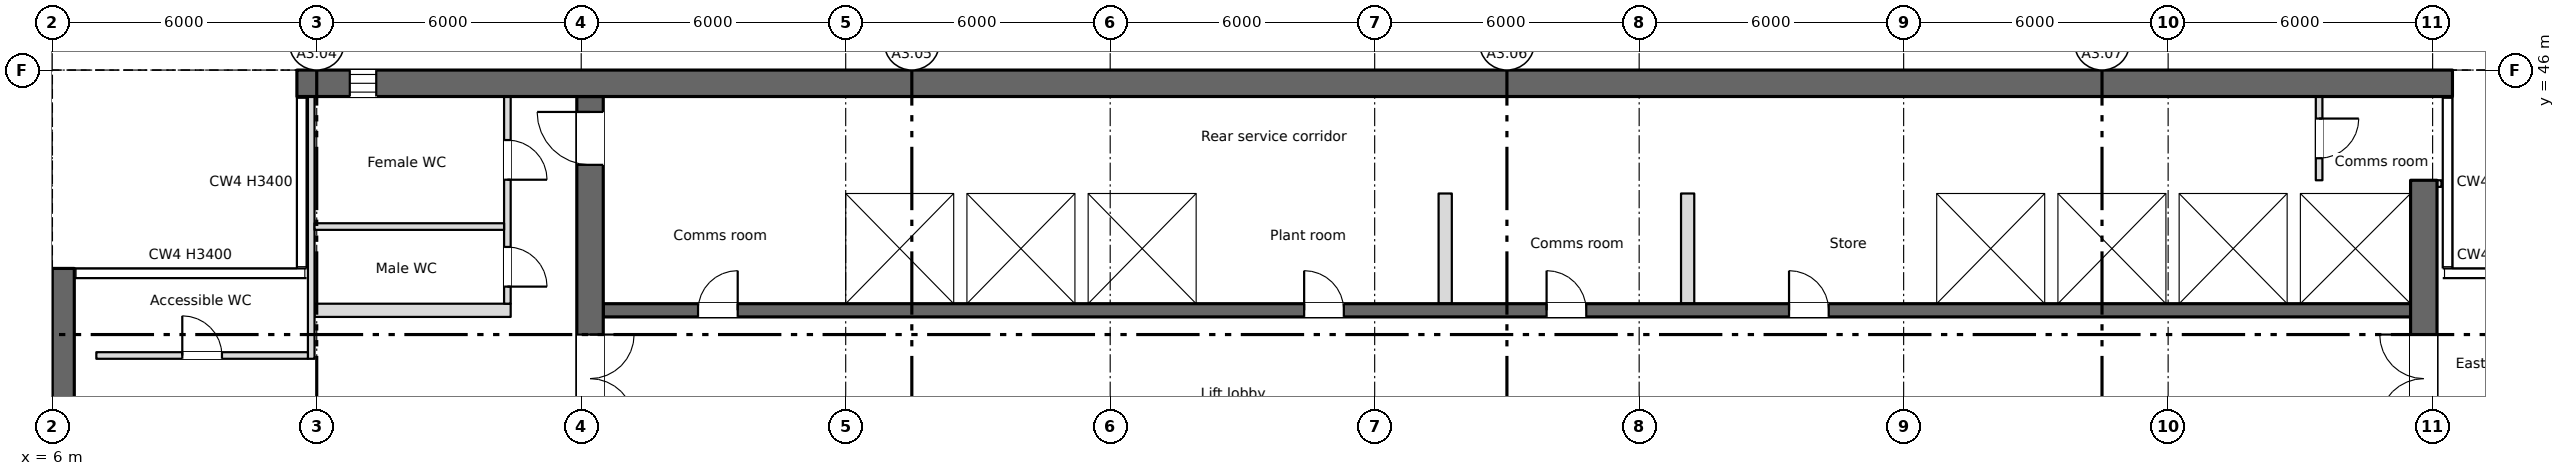
"""IFC4 building model, lengths in metres.
Left out: names, types, materials, properties, quantities, classifications, styles, units other than length and angle.
Written with IfcOpenShell. Run it as: python <this file> out.ifc"""

import sys

from ifc_helpers import new_model, si_unit, direction, frame, frame_2d, origin, place, context, subcontext, project, spatial, rectangle, extrude, element, fill, save


model = new_model("IFC4")
c1 = context("Model", 3, precision=1e-05, world=origin(), true_north=direction((0.0, 1.0)))
c2 = subcontext(c1, "Body", "Model", "MODEL_VIEW")
j1 = project(units=[si_unit("LENGTHUNIT", "METRE"), si_unit("PLANEANGLEUNIT", "RADIAN")], contexts=[c1])
p1 = place(None, origin())
s1 = spatial("IfcSite", under=j1, at=p1, CompositionType="ELEMENT")
p2 = place(p1, origin())
s2 = spatial("IfcBuilding", under=s1, at=p2, CompositionType="ELEMENT")
p3 = place(p2, frame((0.0, 0.0, 235.55)))
s3 = spatial("IfcBuildingStorey", under=s2, at=p3, CompositionType="ELEMENT", Elevation=235.55)
p4 = place(p3, frame((6.25, 8.5, 0.0), z_axis=(0.0, 0.0, 1.0), x_axis=(0.0, 1.0, 0.0)))
e1 = element("IfcWall", 1, at=p4, inside=s3, PredefinedType="SHEAR", context=c2, shape_type="SweptSolid", body=[
    extrude(rectangle(XDim=33.0, YDim=0.5, at=frame_2d((16.5, 0.0))), origin(), (0.0, 0.0, 1.0), 3.4),
])
p5 = place(p4, frame((1.6, 0.0, 0.6)))
e2 = element("IfcOpeningElement", 2, at=p5, cuts=e1, PredefinedType="OPENING", context=c2, shape_type="SweptSolid", body=[
    extrude(rectangle(XDim=0.6, YDim=2.4, at=frame_2d((0.3, 1.2))), frame((0.0, 0.26, 0.0), z_axis=(0.0, -1.0, 0.0), x_axis=(1.0, 0.0, 0.0)), (0.0, 0.0, 1.0), 0.52),
])
p6 = place(p4, frame((7.55, 0.0, 0.6)))
e3 = element("IfcOpeningElement", 3, at=p6, cuts=e1, PredefinedType="OPENING", context=c2, shape_type="SweptSolid", body=[
    extrude(rectangle(XDim=0.6, YDim=2.4, at=frame_2d((0.3, 1.2))), frame((0.0, 0.26, 0.0), z_axis=(0.0, -1.0, 0.0), x_axis=(1.0, 0.0, 0.0)), (0.0, 0.0, 1.0), 0.52),
])
p7 = place(p4, frame((13.2, 0.0, 0.6)))
e4 = element("IfcOpeningElement", 4, at=p7, cuts=e1, PredefinedType="OPENING", context=c2, shape_type="SweptSolid", body=[
    extrude(rectangle(XDim=0.6, YDim=2.4, at=frame_2d((0.3, 1.2))), frame((0.0, 0.26, 0.0), z_axis=(0.0, -1.0, 0.0), x_axis=(1.0, 0.0, 0.0)), (0.0, 0.0, 1.0), 0.52),
])
p8 = place(p3, frame((11.55, 45.7, 0.0), z_axis=(0.0, 0.0, 1.0), x_axis=(1.0, 0.0, 0.0)))
e5 = element("IfcWall", 5, at=p8, inside=s3, PredefinedType="SHEAR", context=c2, shape_type="SweptSolid", body=[
    extrude(rectangle(XDim=48.9, YDim=0.6, at=frame_2d((24.45, 0.0))), origin(), (0.0, 0.0, 1.0), 3.4),
])
p9 = place(p8, frame((1.2, 0.0, 0.6)))
e6 = element("IfcOpeningElement", 6, at=p9, cuts=e5, PredefinedType="OPENING", context=c2, shape_type="SweptSolid", body=[
    extrude(rectangle(XDim=0.6, YDim=2.4, at=frame_2d((0.3, 1.2))), frame((0.0, 0.31, 0.0), z_axis=(0.0, -1.0, 0.0), x_axis=(1.0, 0.0, 0.0)), (0.0, 0.0, 1.0), 0.62),
])
p10 = place(p3, frame((6.75, 28.4, 0.0), z_axis=(0.0, 0.0, 1.0), x_axis=(0.0, 1.0, 0.0)))
e7 = element("IfcWall", 7, at=p10, inside=s3, PredefinedType="SHEAR", context=c2, shape_type="SweptSolid", body=[
    extrude(rectangle(XDim=12.85, YDim=0.5, at=frame_2d((6.425, 0.0))), origin(), (0.0, 0.0, 1.0), 3.4),
])
p11 = place(p3, frame((18.2, 28.4, 0.0), z_axis=(0.0, 0.0, 1.0), x_axis=(0.0, 1.0, 0.0)))
e8 = element("IfcWall", 8, at=p11, inside=s3, PredefinedType="SHEAR", context=c2, shape_type="SweptSolid", body=[
    extrude(rectangle(XDim=17.0, YDim=0.6, at=frame_2d((8.5, 0.0))), origin(), (0.0, 0.0, 1.0), 3.4),
])
p12 = place(p11, frame((9.6, 0.0, 0.0)))
e9 = element("IfcOpeningElement", 9, at=p12, cuts=e8, PredefinedType="OPENING", context=c2, shape_type="SweptSolid", body=[
    extrude(rectangle(XDim=2.0, YDim=2.1, at=frame_2d((1.0, 1.05))), frame((0.0, 0.31, 0.0), z_axis=(0.0, -1.0, 0.0), x_axis=(1.0, 0.0, 0.0)), (0.0, 0.0, 1.0), 0.62),
])
p13 = place(p11, frame((15.45, 0.0, 0.0)))
e10 = element("IfcOpeningElement", 10, at=p13, cuts=e8, PredefinedType="OPENING", context=c2, shape_type="SweptSolid", body=[
    extrude(rectangle(XDim=1.2, YDim=2.1, at=frame_2d((0.6, 1.05))), frame((0.0, 0.31, 0.0), z_axis=(0.0, -1.0, 0.0), x_axis=(1.0, 0.0, 0.0)), (0.0, 0.0, 1.0), 0.62),
])
p14 = place(p3, frame((59.8, 28.4, 0.0), z_axis=(0.0, 0.0, 1.0), x_axis=(0.0, 1.0, 0.0)))
e11 = element("IfcWall", 11, at=p14, inside=s3, PredefinedType="SHEAR", context=c2, shape_type="SweptSolid", body=[
    extrude(rectangle(XDim=15.1, YDim=0.6, at=frame_2d((7.55, 0.0))), origin(), (0.0, 0.0, 1.0), 3.4),
])
p15 = place(p14, frame((9.6, 0.0, 0.0)))
e12 = element("IfcOpeningElement", 12, at=p15, cuts=e11, PredefinedType="OPENING", context=c2, shape_type="SweptSolid", body=[
    extrude(rectangle(XDim=2.0, YDim=2.1, at=frame_2d((1.0, 1.05))), frame((0.0, 0.31, 0.0), z_axis=(0.0, -1.0, 0.0), x_axis=(1.0, 0.0, 0.0)), (0.0, 0.0, 1.0), 0.62),
])
p16 = place(p3, frame((18.5, 40.55, 0.0), z_axis=(0.0, 0.0, 1.0), x_axis=(1.0, 0.0, 0.0)))
e13 = element("IfcWall", 13, at=p16, inside=s3, PredefinedType="SHEAR", context=c2, shape_type="SweptSolid", body=[
    extrude(rectangle(XDim=41.0, YDim=0.3, at=frame_2d((20.5, 0.0))), origin(), (0.0, 0.0, 1.0), 3.4),
])
p17 = place(p16, frame((2.15, 0.0, 0.0)))
e14 = element("IfcOpeningElement", 14, at=p17, cuts=e13, PredefinedType="OPENING", context=c2, shape_type="SweptSolid", body=[
    extrude(rectangle(XDim=0.9, YDim=2.1, at=frame_2d((0.45, 1.05))), frame((0.0, 0.16, 0.0), z_axis=(0.0, -1.0, 0.0), x_axis=(1.0, 0.0, 0.0)), (0.0, 0.0, 1.0), 0.32),
])
p18 = place(p16, frame((15.9, 0.0, 0.0)))
e15 = element("IfcOpeningElement", 15, at=p18, cuts=e13, PredefinedType="OPENING", context=c2, shape_type="SweptSolid", body=[
    extrude(rectangle(XDim=0.9, YDim=2.1, at=frame_2d((0.45, 1.05))), frame((0.0, 0.16, 0.0), z_axis=(0.0, -1.0, 0.0), x_axis=(1.0, 0.0, 0.0)), (0.0, 0.0, 1.0), 0.32),
])
p19 = place(p16, frame((21.4, 0.0, 0.0)))
e16 = element("IfcOpeningElement", 16, at=p19, cuts=e13, PredefinedType="OPENING", context=c2, shape_type="SweptSolid", body=[
    extrude(rectangle(XDim=0.9, YDim=2.1, at=frame_2d((0.45, 1.05))), frame((0.0, 0.16, 0.0), z_axis=(0.0, -1.0, 0.0), x_axis=(1.0, 0.0, 0.0)), (0.0, 0.0, 1.0), 0.32),
])
p20 = place(p16, frame((26.9, 0.0, 0.0)))
e17 = element("IfcOpeningElement", 17, at=p20, cuts=e13, PredefinedType="OPENING", context=c2, shape_type="SweptSolid", body=[
    extrude(rectangle(XDim=0.9, YDim=2.1, at=frame_2d((0.45, 1.05))), frame((0.0, 0.16, 0.0), z_axis=(0.0, -1.0, 0.0), x_axis=(1.0, 0.0, 0.0)), (0.0, 0.0, 1.0), 0.32),
])
p21 = place(p16, frame((6.175, 0.0, 0.0)))
e18 = element("IfcOpeningElement", 18, at=p21, cuts=e13, PredefinedType="OPENING", context=c2, shape_type="SweptSolid", body=[
    extrude(rectangle(XDim=1.1, YDim=2.1, at=frame_2d((0.55, 1.05))), frame((0.0, 0.16, 0.0), z_axis=(0.0, -1.0, 0.0), x_axis=(1.0, 0.0, 0.0)), (0.0, 0.0, 1.0), 0.32),
])
p22 = place(p16, frame((8.925, 0.0, 0.0)))
e19 = element("IfcOpeningElement", 19, at=p22, cuts=e13, PredefinedType="OPENING", context=c2, shape_type="SweptSolid", body=[
    extrude(rectangle(XDim=1.1, YDim=2.1, at=frame_2d((0.55, 1.05))), frame((0.0, 0.16, 0.0), z_axis=(0.0, -1.0, 0.0), x_axis=(1.0, 0.0, 0.0)), (0.0, 0.0, 1.0), 0.32),
])
p23 = place(p16, frame((11.675, 0.0, 0.0)))
e20 = element("IfcOpeningElement", 20, at=p23, cuts=e13, PredefinedType="OPENING", context=c2, shape_type="SweptSolid", body=[
    extrude(rectangle(XDim=1.1, YDim=2.1, at=frame_2d((0.55, 1.05))), frame((0.0, 0.16, 0.0), z_axis=(0.0, -1.0, 0.0), x_axis=(1.0, 0.0, 0.0)), (0.0, 0.0, 1.0), 0.32),
])
p24 = place(p16, frame((30.925, 0.0, 0.0)))
e21 = element("IfcOpeningElement", 21, at=p24, cuts=e13, PredefinedType="OPENING", context=c2, shape_type="SweptSolid", body=[
    extrude(rectangle(XDim=1.1, YDim=2.1, at=frame_2d((0.55, 1.05))), frame((0.0, 0.16, 0.0), z_axis=(0.0, -1.0, 0.0), x_axis=(1.0, 0.0, 0.0)), (0.0, 0.0, 1.0), 0.32),
])
p25 = place(p16, frame((33.675, 0.0, 0.0)))
e22 = element("IfcOpeningElement", 22, at=p25, cuts=e13, PredefinedType="OPENING", context=c2, shape_type="SweptSolid", body=[
    extrude(rectangle(XDim=1.1, YDim=2.1, at=frame_2d((0.55, 1.05))), frame((0.0, 0.16, 0.0), z_axis=(0.0, -1.0, 0.0), x_axis=(1.0, 0.0, 0.0)), (0.0, 0.0, 1.0), 0.32),
])
p26 = place(p16, frame((36.375, 0.0, 0.0)))
e23 = element("IfcOpeningElement", 23, at=p26, cuts=e13, PredefinedType="OPENING", context=c2, shape_type="SweptSolid", body=[
    extrude(rectangle(XDim=1.2, YDim=2.1, at=frame_2d((0.6, 1.05))), frame((0.0, 0.16, 0.0), z_axis=(0.0, -1.0, 0.0), x_axis=(1.0, 0.0, 0.0)), (0.0, 0.0, 1.0), 0.32),
])
p27 = place(p16, frame((39.15, 0.0, 0.0)))
e24 = element("IfcOpeningElement", 24, at=p27, cuts=e13, PredefinedType="OPENING", context=c2, shape_type="SweptSolid", body=[
    extrude(rectangle(XDim=1.2, YDim=2.1, at=frame_2d((0.6, 1.05))), frame((0.0, 0.16, 0.0), z_axis=(0.0, -1.0, 0.0), x_axis=(1.0, 0.0, 0.0)), (0.0, 0.0, 1.0), 0.32),
])
p28 = place(p3, frame((18.5, 43.35, 0.0), z_axis=(0.0, 0.0, 1.0), x_axis=(1.0, 0.0, 0.0)))
e25 = element("IfcWall", 25, at=p28, inside=s3, PredefinedType="SHEAR", context=c2, shape_type="SweptSolid", body=[
    extrude(rectangle(XDim=41.0, YDim=0.3, at=frame_2d((20.5, 0.0))), origin(), (0.0, 0.0, 1.0), 3.4),
])
p29 = place(p3, frame((11.95, 40.55, 0.0), z_axis=(0.0, 0.0, 1.0), x_axis=(1.0, 0.0, 0.0)))
e26 = element("IfcWall", 26, at=p29, inside=s3, PredefinedType="PARTITIONING", context=c2, shape_type="SweptSolid", body=[
    extrude(rectangle(XDim=4.45, YDim=0.3, at=frame_2d((2.225, 0.0))), origin(), (0.0, 0.0, 1.0), 3.4),
])
for number, where, z_axis, x_axis in (
    (27, (23.85, 40.7, 0.0), (0.0, 0.0, 1.0), (0.0, 1.0, 0.0)),
    (28, (26.6, 40.7, 0.0), (0.0, 0.0, 1.0), (0.0, 1.0, 0.0)),
    (29, (29.35, 40.7, 0.0), (0.0, 0.0, 1.0), (0.0, 1.0, 0.0)),
    (30, (32.1, 40.7, 0.0), (0.0, 0.0, 1.0), (0.0, 1.0, 0.0)),
    (31, (48.6, 40.7, 0.0), (0.0, 0.0, 1.0), (0.0, 1.0, 0.0)),
    (32, (51.35, 40.7, 0.0), (0.0, 0.0, 1.0), (0.0, 1.0, 0.0)),
    (33, (54.1, 40.7, 0.0), (0.0, 0.0, 1.0), (0.0, 1.0, 0.0)),
    (34, (56.85, 40.7, 0.0), (0.0, 0.0, 1.0), (0.0, 1.0, 0.0)),
):
    element("IfcWall", number, at=place(p3, frame(where, z_axis=z_axis, x_axis=x_axis)), inside=s3, PredefinedType="SHEAR", context=c2, shape_type="SweptSolid", body=[
        extrude(rectangle(XDim=2.5, YDim=0.3, at=frame_2d((1.25, 0.0))), origin(), (0.0, 0.0, 1.0), 3.4),
    ])
p30 = place(p3, frame((16.325, 45.4, 0.0), z_axis=(0.0, 0.0, 1.0), x_axis=(0.0, -1.0, 0.0)))
e35 = element("IfcWall", 35, at=p30, inside=s3, PredefinedType="PARTITIONING", context=c2, shape_type="SweptSolid", body=[
    extrude(rectangle(XDim=4.7, YDim=0.15, at=frame_2d((2.35, 0.0))), origin(), (0.0, 0.0, 1.0), 3.4),
])
p31 = place(p30, frame((3.413, 0.0, 0.0)))
e36 = element("IfcOpeningElement", 36, at=p31, cuts=e35, PredefinedType="OPENING", context=c2, shape_type="SweptSolid", body=[
    extrude(rectangle(XDim=0.9, YDim=2.1, at=frame_2d((0.45, 1.05))), frame((0.0, 0.085, 0.0), z_axis=(0.0, -1.0, 0.0), x_axis=(1.0, 0.0, 0.0)), (0.0, 0.0, 1.0), 0.17),
])
p32 = place(p30, frame((0.988, 0.0, 0.0)))
e37 = element("IfcOpeningElement", 37, at=p32, cuts=e35, PredefinedType="OPENING", context=c2, shape_type="SweptSolid", body=[
    extrude(rectangle(XDim=0.9, YDim=2.1, at=frame_2d((0.45, 1.05))), frame((0.0, 0.085, 0.0), z_axis=(0.0, -1.0, 0.0), x_axis=(1.0, 0.0, 0.0)), (0.0, 0.0, 1.0), 0.17),
])
p33 = place(p3, frame((11.875, 39.45, 0.0), z_axis=(0.0, 0.0, 1.0), x_axis=(0.0, 1.0, 0.0)))
e38 = element("IfcWall", 38, at=p33, inside=s3, PredefinedType="PARTITIONING", context=c2, shape_type="SweptSolid", body=[
    extrude(rectangle(XDim=5.95, YDim=0.15, at=frame_2d((2.975, 0.0))), origin(), (0.0, 0.0, 1.0), 3.4),
])
p34 = place(p3, frame((7.0, 39.525, 0.0), z_axis=(0.0, 0.0, 1.0), x_axis=(1.0, 0.0, 0.0)))
e39 = element("IfcWall", 39, at=p34, inside=s3, PredefinedType="PARTITIONING", context=c2, shape_type="SweptSolid", body=[
    extrude(rectangle(XDim=4.8, YDim=0.15, at=frame_2d((2.4, 0.0))), origin(), (0.0, 0.0, 1.0), 3.4),
])
p35 = place(p34, frame((1.95, 0.0, 0.0)))
e40 = element("IfcOpeningElement", 40, at=p35, cuts=e39, PredefinedType="OPENING", context=c2, shape_type="SweptSolid", body=[
    extrude(rectangle(XDim=0.9, YDim=2.1, at=frame_2d((0.45, 1.05))), frame((0.0, 0.085, 0.0), z_axis=(0.0, -1.0, 0.0), x_axis=(1.0, 0.0, 0.0)), (0.0, 0.0, 1.0), 0.17),
])
p36 = place(p3, frame((11.95, 42.45, 0.0), z_axis=(0.0, 0.0, 1.0), x_axis=(1.0, 0.0, 0.0)))
e41 = element("IfcWall", 41, at=p36, inside=s3, PredefinedType="PARTITIONING", context=c2, shape_type="SweptSolid", body=[
    extrude(rectangle(XDim=4.3, YDim=0.15, at=frame_2d((2.15, 0.0))), origin(), (0.0, 0.0, 1.0), 3.4),
])
p37 = place(p3, frame((57.425, 45.4, 0.0), z_axis=(0.0, 0.0, 1.0), x_axis=(0.0, -1.0, 0.0)))
e42 = element("IfcWall", 42, at=p37, inside=s3, PredefinedType="PARTITIONING", context=c2, shape_type="SweptSolid", body=[
    extrude(rectangle(XDim=1.9, YDim=0.15, at=frame_2d((0.95, 0.0))), origin(), (0.0, 0.0, 1.0), 3.4),
])
p38 = place(p37, frame((0.5, 0.0, 0.0)))
e43 = element("IfcOpeningElement", 43, at=p38, cuts=e42, PredefinedType="OPENING", context=c2, shape_type="SweptSolid", body=[
    extrude(rectangle(XDim=0.9, YDim=2.1, at=frame_2d((0.45, 1.05))), frame((0.0, 0.085, 0.0), z_axis=(0.0, -1.0, 0.0), x_axis=(1.0, 0.0, 0.0)), (0.0, 0.0, 1.0), 0.17),
])
p39 = place(p3, frame((60.15, 43.35, 0.0), z_axis=(0.0, 0.0, 1.0), x_axis=(0.0, 1.0, 0.0)))
e44 = element("IfcWall", 44, at=p39, inside=s3, PredefinedType="PARTITIONING", context=c2, shape_type="SweptSolid", body=[
    extrude(rectangle(XDim=0.15, YDim=0.1, at=frame_2d((0.075, 0.0))), origin(), (0.0, 0.0, 1.0), 3.4),
])
for number, where, z_axis, x_axis in (
    (45, (37.6, 40.7, 0.0), (0.0, 0.0, 1.0), (0.0, 1.0, 0.0)),
    (46, (43.1, 40.7, 0.0), (0.0, 0.0, 1.0), (0.0, 1.0, 0.0)),
):
    element("IfcWall", number, at=place(p3, frame(where, z_axis=z_axis, x_axis=x_axis)), inside=s3, PredefinedType="PARTITIONING", context=c2, shape_type="SweptSolid", body=[
        extrude(rectangle(XDim=2.5, YDim=0.3, at=frame_2d((1.25, 0.0))), origin(), (0.0, 0.0, 1.0), 3.4),
    ])
p40 = place(p9, origin())
e47 = element("IfcWindow", 47, at=p40, inside=s3, PartitioningType="SINGLE_PANEL", PredefinedType="WINDOW", context=c2, shape_type="SweptSolid", body=[
    extrude(rectangle(XDim=0.6, YDim=2.4, at=frame_2d((0.3, 1.2))), frame((0.0, 0.03, 0.0), z_axis=(0.0, -1.0, 0.0), x_axis=(1.0, 0.0, 0.0)), (0.0, 0.0, 1.0), 0.06),
])
fill(e6, e47)
p41 = place(p35, origin())
e48 = element("IfcDoor", 48, at=p41, inside=s3, OperationType="SINGLE_SWING_LEFT", PredefinedType="DOOR", context=c2, shape_type="SweptSolid", body=[
    extrude(rectangle(XDim=0.9, YDim=2.1, at=frame_2d((0.45, 1.05))), frame((0.0, 0.025, 0.0), z_axis=(0.0, -1.0, 0.0), x_axis=(1.0, 0.0, 0.0)), (0.0, 0.0, 1.0), 0.05),
])
fill(e40, e48)
p42 = place(p31, origin())
e49 = element("IfcDoor", 49, at=p42, inside=s3, OperationType="SINGLE_SWING_RIGHT", PredefinedType="DOOR", context=c2, shape_type="SweptSolid", body=[
    extrude(rectangle(XDim=0.9, YDim=2.1, at=frame_2d((0.45, 1.05))), frame((0.0, 0.025, 0.0), z_axis=(0.0, -1.0, 0.0), x_axis=(1.0, 0.0, 0.0)), (0.0, 0.0, 1.0), 0.05),
])
fill(e36, e49)
p43 = place(p32, origin())
e50 = element("IfcDoor", 50, at=p43, inside=s3, OperationType="SINGLE_SWING_RIGHT", PredefinedType="DOOR", context=c2, shape_type="SweptSolid", body=[
    extrude(rectangle(XDim=0.9, YDim=2.1, at=frame_2d((0.45, 1.05))), frame((0.0, 0.025, 0.0), z_axis=(0.0, -1.0, 0.0), x_axis=(1.0, 0.0, 0.0)), (0.0, 0.0, 1.0), 0.05),
])
fill(e37, e50)
p44 = place(p38, origin())
e51 = element("IfcDoor", 51, at=p44, inside=s3, OperationType="SINGLE_SWING_LEFT", PredefinedType="DOOR", context=c2, shape_type="SweptSolid", body=[
    extrude(rectangle(XDim=0.9, YDim=2.1, at=frame_2d((0.45, 1.05))), frame((0.0, 0.025, 0.0), z_axis=(0.0, -1.0, 0.0), x_axis=(1.0, 0.0, 0.0)), (0.0, 0.0, 1.0), 0.05),
])
fill(e43, e51)
p45 = place(p17, origin())
e52 = element("IfcDoor", 52, at=p45, inside=s3, OperationType="SINGLE_SWING_RIGHT", PredefinedType="DOOR", context=c2, shape_type="SweptSolid", body=[
    extrude(rectangle(XDim=0.9, YDim=2.1, at=frame_2d((0.45, 1.05))), frame((0.0, 0.025, 0.0), z_axis=(0.0, -1.0, 0.0), x_axis=(1.0, 0.0, 0.0)), (0.0, 0.0, 1.0), 0.05),
])
fill(e14, e52)
p46 = place(p18, origin())
e53 = element("IfcDoor", 53, at=p46, inside=s3, OperationType="SINGLE_SWING_LEFT", PredefinedType="DOOR", context=c2, shape_type="SweptSolid", body=[
    extrude(rectangle(XDim=0.9, YDim=2.1, at=frame_2d((0.45, 1.05))), frame((0.0, 0.025, 0.0), z_axis=(0.0, -1.0, 0.0), x_axis=(1.0, 0.0, 0.0)), (0.0, 0.0, 1.0), 0.05),
])
fill(e15, e53)
p47 = place(p19, origin())
e54 = element("IfcDoor", 54, at=p47, inside=s3, OperationType="SINGLE_SWING_LEFT", PredefinedType="DOOR", context=c2, shape_type="SweptSolid", body=[
    extrude(rectangle(XDim=0.9, YDim=2.1, at=frame_2d((0.45, 1.05))), frame((0.0, 0.025, 0.0), z_axis=(0.0, -1.0, 0.0), x_axis=(1.0, 0.0, 0.0)), (0.0, 0.0, 1.0), 0.05),
])
fill(e16, e54)
p48 = place(p20, origin())
e55 = element("IfcDoor", 55, at=p48, inside=s3, OperationType="SINGLE_SWING_LEFT", PredefinedType="DOOR", context=c2, shape_type="SweptSolid", body=[
    extrude(rectangle(XDim=0.9, YDim=2.1, at=frame_2d((0.45, 1.05))), frame((0.0, 0.025, 0.0), z_axis=(0.0, -1.0, 0.0), x_axis=(1.0, 0.0, 0.0)), (0.0, 0.0, 1.0), 0.05),
])
fill(e17, e55)
p49 = place(p21, origin())
e56 = element("IfcDoor", 56, at=p49, inside=s3, OperationType="SLIDING_TO_LEFT", PredefinedType="DOOR", context=c2, shape_type="SweptSolid", body=[
    extrude(rectangle(XDim=1.1, YDim=2.1, at=frame_2d((0.55, 1.05))), frame((0.0, 0.025, 0.0), z_axis=(0.0, -1.0, 0.0), x_axis=(1.0, 0.0, 0.0)), (0.0, 0.0, 1.0), 0.05),
])
fill(e18, e56)
p50 = place(p22, origin())
e57 = element("IfcDoor", 57, at=p50, inside=s3, OperationType="SLIDING_TO_LEFT", PredefinedType="DOOR", context=c2, shape_type="SweptSolid", body=[
    extrude(rectangle(XDim=1.1, YDim=2.1, at=frame_2d((0.55, 1.05))), frame((0.0, 0.025, 0.0), z_axis=(0.0, -1.0, 0.0), x_axis=(1.0, 0.0, 0.0)), (0.0, 0.0, 1.0), 0.05),
])
fill(e19, e57)
p51 = place(p23, origin())
e58 = element("IfcDoor", 58, at=p51, inside=s3, OperationType="SLIDING_TO_LEFT", PredefinedType="DOOR", context=c2, shape_type="SweptSolid", body=[
    extrude(rectangle(XDim=1.1, YDim=2.1, at=frame_2d((0.55, 1.05))), frame((0.0, 0.025, 0.0), z_axis=(0.0, -1.0, 0.0), x_axis=(1.0, 0.0, 0.0)), (0.0, 0.0, 1.0), 0.05),
])
fill(e20, e58)
p52 = place(p24, origin())
e59 = element("IfcDoor", 59, at=p52, inside=s3, OperationType="SLIDING_TO_LEFT", PredefinedType="DOOR", context=c2, shape_type="SweptSolid", body=[
    extrude(rectangle(XDim=1.1, YDim=2.1, at=frame_2d((0.55, 1.05))), frame((0.0, 0.025, 0.0), z_axis=(0.0, -1.0, 0.0), x_axis=(1.0, 0.0, 0.0)), (0.0, 0.0, 1.0), 0.05),
])
fill(e21, e59)
p53 = place(p25, origin())
e60 = element("IfcDoor", 60, at=p53, inside=s3, OperationType="SLIDING_TO_LEFT", PredefinedType="DOOR", context=c2, shape_type="SweptSolid", body=[
    extrude(rectangle(XDim=1.1, YDim=2.1, at=frame_2d((0.55, 1.05))), frame((0.0, 0.025, 0.0), z_axis=(0.0, -1.0, 0.0), x_axis=(1.0, 0.0, 0.0)), (0.0, 0.0, 1.0), 0.05),
])
fill(e22, e60)
p54 = place(p26, origin())
e61 = element("IfcDoor", 61, at=p54, inside=s3, OperationType="SLIDING_TO_LEFT", PredefinedType="DOOR", context=c2, shape_type="SweptSolid", body=[
    extrude(rectangle(XDim=1.2, YDim=2.1, at=frame_2d((0.6, 1.05))), frame((0.0, 0.025, 0.0), z_axis=(0.0, -1.0, 0.0), x_axis=(1.0, 0.0, 0.0)), (0.0, 0.0, 1.0), 0.05),
])
fill(e23, e61)
p55 = place(p27, origin())
e62 = element("IfcDoor", 62, at=p55, inside=s3, OperationType="SLIDING_TO_LEFT", PredefinedType="DOOR", context=c2, shape_type="SweptSolid", body=[
    extrude(rectangle(XDim=1.2, YDim=2.1, at=frame_2d((0.6, 1.05))), frame((0.0, 0.025, 0.0), z_axis=(0.0, -1.0, 0.0), x_axis=(1.0, 0.0, 0.0)), (0.0, 0.0, 1.0), 0.05),
])
fill(e24, e62)
p56 = place(p12, origin())
e63 = element("IfcDoor", 63, at=p56, inside=s3, OperationType="DOUBLE_DOOR_SINGLE_SWING", PredefinedType="DOOR", context=c2, shape_type="SweptSolid", body=[
    extrude(rectangle(XDim=2.0, YDim=2.1, at=frame_2d((1.0, 1.05))), frame((0.0, 0.025, 0.0), z_axis=(0.0, -1.0, 0.0), x_axis=(1.0, 0.0, 0.0)), (0.0, 0.0, 1.0), 0.05),
])
fill(e9, e63)
p57 = place(p15, origin())
e64 = element("IfcDoor", 64, at=p57, inside=s3, OperationType="DOUBLE_DOOR_SINGLE_SWING", PredefinedType="DOOR", context=c2, shape_type="SweptSolid", body=[
    extrude(rectangle(XDim=2.0, YDim=2.1, at=frame_2d((1.0, 1.05))), frame((0.0, 0.025, 0.0), z_axis=(0.0, -1.0, 0.0), x_axis=(1.0, 0.0, 0.0)), (0.0, 0.0, 1.0), 0.05),
])
fill(e12, e64)
p58 = place(p13, origin())
e65 = element("IfcDoor", 65, at=p58, inside=s3, OperationType="SINGLE_SWING_RIGHT", PredefinedType="DOOR", context=c2, shape_type="SweptSolid", body=[
    extrude(rectangle(XDim=1.2, YDim=2.1, at=frame_2d((0.6, 1.05))), frame((0.0, 0.025, 0.0), z_axis=(0.0, -1.0, 0.0), x_axis=(1.0, 0.0, 0.0)), (0.0, 0.0, 1.0), 0.05),
])
fill(e10, e65)
save(model, sys.argv[1])
